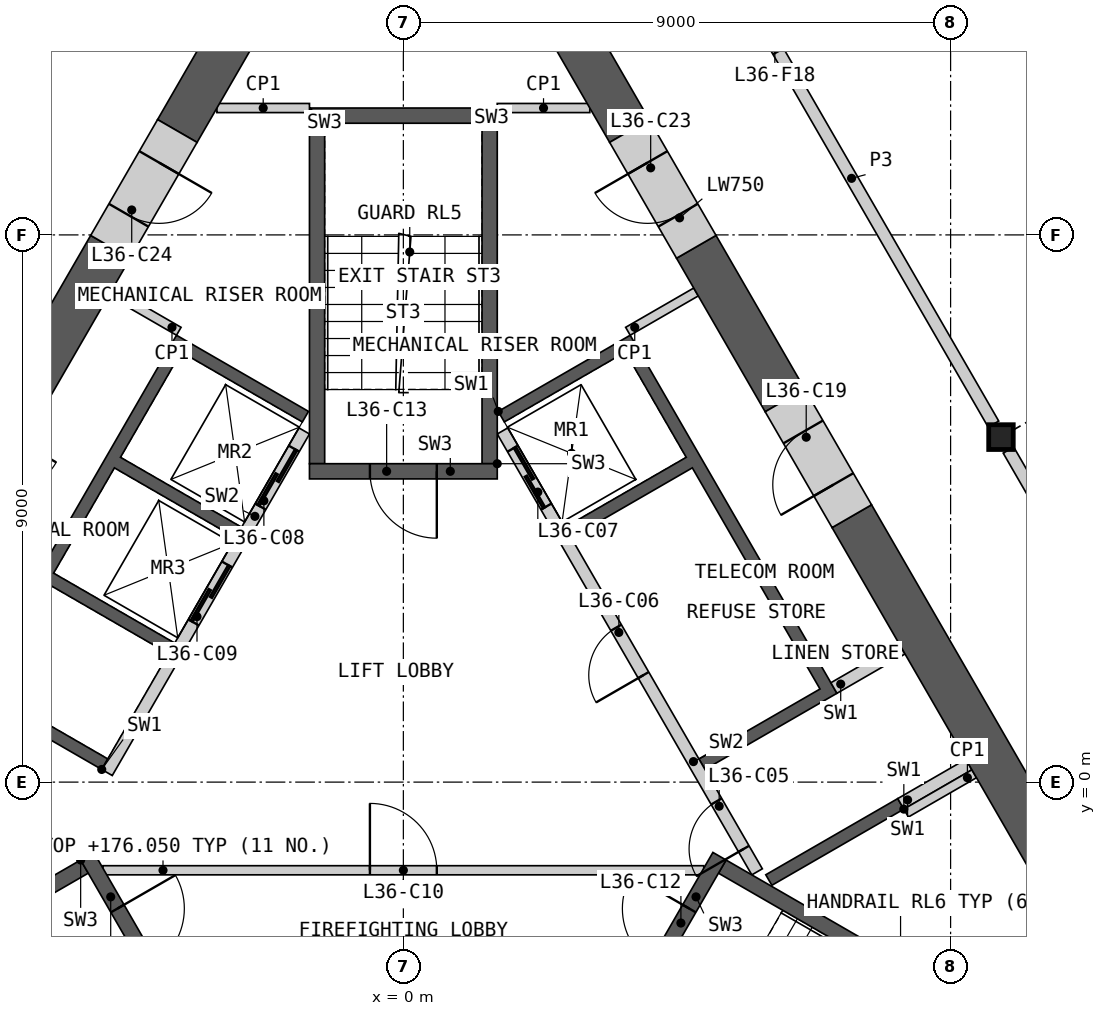
"""IFC4 building model, lengths in metres.
Left out: names, types, materials, properties, quantities, classifications, styles, units other than length and angle.
Written with IfcOpenShell. Run it as: python <this file> out.ifc"""

import sys

from ifc_helpers import new_model, si_unit, direction, frame, frame_2d, origin, origin_2d, place, context, subcontext, project, spatial, polyline, rectangle, i_section, outline, extrude, element, fill, save


model = new_model("IFC4")
c1 = context("Model", 3, precision=1e-05, world=origin(), true_north=direction((0.0, 1.0)))
c2 = subcontext(c1, "Body", "Model", "MODEL_VIEW")
j1 = project(units=[si_unit("LENGTHUNIT", "METRE"), si_unit("PLANEANGLEUNIT", "RADIAN")], contexts=[c1])
p1 = place(None, origin())
s1 = spatial("IfcSite", under=j1, at=p1, CompositionType="ELEMENT")
p2 = place(p1, origin())
s2 = spatial("IfcBuilding", under=s1, at=p2, CompositionType="ELEMENT")
p3 = place(p2, frame((0.0, 0.0, 172.8)))
s3 = spatial("IfcBuildingStorey", under=s2, at=p3, CompositionType="ELEMENT", Elevation=172.8)
p4 = place(p3, frame((9.828, 5.675, 0.0), z_axis=(0.0, 0.0, 1.0), x_axis=(1.0, 0.0, 0.0)))
e1 = element("IfcColumn", 1, at=p4, inside=s3, PredefinedType="COLUMN", context=c2, shape_type="SweptSolid", body=[
    extrude(i_section(OverallWidth=0.404, OverallDepth=0.407, WebThickness=0.027, FlangeThickness=0.044, at=origin_2d()), origin(), (0.0, 0.0, 1.0), 3.6),
])
p5 = place(p3, origin())
e2 = element("IfcWall", 2, at=p5, inside=s3, PredefinedType="SHEAR", context=c2, shape_type="SweptSolid", body=[
    extrude(outline(polyline([(1.561, 6.097), (3.731, 7.35), (7.131, 1.461), (4.96, 0.208), (4.861, 0.381), (6.852, 1.531), (4.752, 5.169), (2.76, 4.019), (2.66, 4.192), (4.652, 5.342), (3.652, 7.074), (1.66, 5.924), (1.561, 6.097)])), origin(), (0.0, 0.0, 1.0), 3.25),
])
p6 = place(p3, origin())
e3 = element("IfcWall", 3, at=p6, inside=s3, PredefinedType="SHEAR", context=c2, shape_type="SweptSolid", body=[
    extrude(outline(polyline([(8.231, -0.444), (6.061, -1.697), (5.96, -1.524), (8.131, -0.271), (8.231, -0.444)])), origin(), (0.0, 0.0, 1.0), 3.25),
])
p7 = place(p3, frame((5.817, -1.476, 0.0), z_axis=(0.0, 0.0, 1.0), x_axis=(-0.500002616675, 0.866023893041, 0.0)))
e4 = element("IfcWall", 4, at=p7, inside=s3, PredefinedType="SOLIDWALL", context=c2, shape_type="SweptSolid", body=[
    extrude(rectangle(XDim=8.373, YDim=0.2, at=frame_2d((4.187, 0.0))), origin(), (0.0, 0.0, 1.0), 3.25),
])
p8 = place(p7, frame((0.437, 0.0, 0.0)))
e5 = element("IfcOpeningElement", 5, at=p8, cuts=e4, PredefinedType="OPENING", context=c2, shape_type="SweptSolid", body=[
    extrude(rectangle(XDim=0.9, YDim=2.1, at=frame_2d((0.45, 1.05))), frame((0.0, 0.11, 0.0), z_axis=(0.0, -1.0, 0.0), x_axis=(1.0, 0.0, 0.0)), (0.0, 0.0, 1.0), 0.22),
])
p9 = place(p7, frame((3.737, 0.0, 0.0)))
e6 = element("IfcOpeningElement", 6, at=p9, cuts=e4, PredefinedType="OPENING", context=c2, shape_type="SweptSolid", body=[
    extrude(rectangle(XDim=0.9, YDim=2.1, at=frame_2d((0.45, 1.05))), frame((0.0, 0.11, 0.0), z_axis=(0.0, -1.0, 0.0), x_axis=(1.0, 0.0, 0.0)), (0.0, 0.0, 1.0), 0.22),
])
p10 = place(p7, frame((6.937, 0.0, 0.0)))
e7 = element("IfcOpeningElement", 7, at=p10, cuts=e4, PredefinedType="OPENING", context=c2, shape_type="SweptSolid", body=[
    extrude(rectangle(XDim=1.1, YDim=2.1, at=frame_2d((0.55, 1.05))), frame((0.0, 0.11, 0.0), z_axis=(0.0, -1.0, 0.0), x_axis=(1.0, 0.0, 0.0)), (0.0, 0.0, 1.0), 0.22),
])
for number, where, z_axis, x_axis in (
    (8, (8.181, -0.357, 0.0), (0.0, 0.0, 1.0), (0.866, 0.5, 0.0)),
    (9, (7.081, 1.548, 0.0), (0.0, 0.0, 1.0), (0.866, 0.5, 0.0)),
):
    element("IfcWall", number, at=place(p3, frame(where, z_axis=z_axis, x_axis=x_axis)), inside=s3, PredefinedType="SHEAR", context=c2, shape_type="SweptSolid", body=[
        extrude(rectangle(XDim=1.293, YDim=0.2, at=frame_2d((0.646, 0.0))), origin(), (0.0, 0.0, 1.0), 3.25),
    ])
p11 = place(p3, origin())
e10 = element("IfcWall", 10, at=p11, inside=s3, PredefinedType="SHEAR", context=c2, shape_type="SweptSolid", body=[
    extrude(outline(polyline([(-4.96, 0.208), (-7.131, 1.461), (-3.731, 7.35), (-1.561, 6.097), (-1.66, 5.924), (-3.652, 7.074), (-4.652, 5.342), (-2.66, 4.192), (-2.76, 4.019), (-4.752, 5.169), (-5.752, 3.437), (-3.76, 2.287), (-3.861, 2.113), (-5.852, 3.263), (-6.852, 1.531), (-4.861, 0.381), (-4.96, 0.208)])), origin(), (0.0, 0.0, 1.0), 3.25),
])
p12 = place(p3, frame((-1.631, 5.776, 0.0), z_axis=(0.0, 0.0, 1.0), x_axis=(-0.499992876559, -0.866029516466, 0.0)))
e11 = element("IfcWall", 11, at=p12, inside=s3, PredefinedType="SOLIDWALL", context=c2, shape_type="SweptSolid", body=[
    extrude(rectangle(XDim=6.486, YDim=0.2, at=frame_2d((3.243, 0.0))), origin(), (0.0, 0.0, 1.0), 3.25),
])
p13 = place(p12, frame((0.337, 0.0, 0.0)))
e12 = element("IfcOpeningElement", 12, at=p13, cuts=e11, PredefinedType="OPENING", context=c2, shape_type="SweptSolid", body=[
    extrude(rectangle(XDim=1.1, YDim=2.1, at=frame_2d((0.55, 1.05))), frame((0.0, 0.11, 0.0), z_axis=(0.0, -1.0, 0.0), x_axis=(1.0, 0.0, 0.0)), (0.0, 0.0, 1.0), 0.22),
])
p14 = place(p12, frame((2.537, 0.0, 0.0)))
e13 = element("IfcOpeningElement", 13, at=p14, cuts=e11, PredefinedType="OPENING", context=c2, shape_type="SweptSolid", body=[
    extrude(rectangle(XDim=1.1, YDim=2.1, at=frame_2d((0.55, 1.05))), frame((0.0, 0.11, 0.0), z_axis=(0.0, -1.0, 0.0), x_axis=(1.0, 0.0, 0.0)), (0.0, 0.0, 1.0), 0.22),
])
p15 = place(p3, frame((-4.941, -1.45, 0.0), z_axis=(0.0, 0.0, 1.0), x_axis=(1.0, 0.0, 0.0)))
e14 = element("IfcWall", 14, at=p15, inside=s3, PredefinedType="PARTITIONING", context=c2, shape_type="SweptSolid", body=[
    extrude(rectangle(XDim=9.882, YDim=0.15, at=frame_2d((4.941, 0.0))), origin(), (0.0, 0.0, 1.0), 3.25),
])
p16 = place(p15, frame((4.391, 0.0, 0.0)))
e15 = element("IfcOpeningElement", 15, at=p16, cuts=e14, PredefinedType="OPENING", context=c2, shape_type="SweptSolid", body=[
    extrude(rectangle(XDim=1.1, YDim=2.1, at=frame_2d((0.55, 1.05))), frame((0.0, 0.085, 0.0), z_axis=(0.0, -1.0, 0.0), x_axis=(1.0, 0.0, 0.0)), (0.0, 0.0, 1.0), 0.17),
])
p17 = place(p3, origin())
e16 = element("IfcWall", 16, at=p17, inside=s3, PredefinedType="SHEAR", context=c2, shape_type="SweptSolid", body=[
    extrude(outline(polyline([(-5.307, -1.281), (-10.374, -4.206), (-10.032, -4.298), (-5.182, -1.498), (-5.307, -1.281)])), origin(), (0.0, 0.0, 1.0), 3.25),
])
p18 = place(p3, frame((-5.199, -1.219, 0.0), z_axis=(0.0, 0.0, 1.0), x_axis=(0.499982516597, -0.866035497597, 0.0)))
e17 = element("IfcWall", 17, at=p18, inside=s3, PredefinedType="SHEAR", context=c2, shape_type="SweptSolid", body=[
    extrude(rectangle(XDim=3.088, YDim=0.25, at=frame_2d((1.544, 0.0))), origin(), (0.0, 0.0, 1.0), 3.25),
])
p19 = place(p18, frame((0.994, 0.0, 0.0)))
e18 = element("IfcOpeningElement", 18, at=p19, cuts=e17, PredefinedType="OPENING", context=c2, shape_type="SweptSolid", body=[
    extrude(rectangle(XDim=1.1, YDim=2.1, at=frame_2d((0.55, 1.05))), frame((0.0, 0.135, 0.0), z_axis=(0.0, -1.0, 0.0), x_axis=(1.0, 0.0, 0.0)), (0.0, 0.0, 1.0), 0.27),
])
p20 = place(p3, origin())
e19 = element("IfcWall", 19, at=p20, inside=s3, PredefinedType="SHEAR", context=c2, shape_type="SweptSolid", body=[
    extrude(outline(polyline([(10.032, -4.298), (10.374, -4.206), (5.307, -1.281), (5.182, -1.498), (10.032, -4.298)])), origin(), (0.0, 0.0, 1.0), 3.25),
])
p21 = place(p3, frame((3.655, -3.893, 0.0), z_axis=(0.0, 0.0, 1.0), x_axis=(0.499982516597, 0.866035497597, 0.0)))
e20 = element("IfcWall", 20, at=p21, inside=s3, PredefinedType="SHEAR", context=c2, shape_type="SweptSolid", body=[
    extrude(rectangle(XDim=3.088, YDim=0.25, at=frame_2d((1.544, 0.0))), origin(), (0.0, 0.0, 1.0), 3.25),
])
p22 = place(p21, frame((0.994, 0.0, 0.0)))
e21 = element("IfcOpeningElement", 21, at=p22, cuts=e20, PredefinedType="OPENING", context=c2, shape_type="SweptSolid", body=[
    extrude(rectangle(XDim=1.1, YDim=2.1, at=frame_2d((0.55, 1.05))), frame((0.0, 0.135, 0.0), z_axis=(0.0, -1.0, 0.0), x_axis=(1.0, 0.0, 0.0)), (0.0, 0.0, 1.0), 0.27),
])
p23 = place(p3, origin())
e22 = element("IfcWall", 22, at=p23, inside=s3, PredefinedType="SHEAR", context=c2, shape_type="SweptSolid", body=[
    extrude(outline(polyline([(1.544, 5.237), (1.544, 11.087), (1.294, 10.837), (1.294, 5.237), (1.544, 5.237)])), origin(), (0.0, 0.0, 1.0), 3.25),
])
p24 = place(p3, origin())
e23 = element("IfcWall", 23, at=p24, inside=s3, PredefinedType="SHEAR", context=c2, shape_type="SweptSolid", body=[
    extrude(outline(polyline([(1.544, 11.087), (-1.544, 11.087), (-1.294, 10.837), (1.294, 10.837), (1.544, 11.087)])), origin(), (0.0, 0.0, 1.0), 3.25),
])
p25 = place(p3, origin())
e24 = element("IfcWall", 24, at=p25, inside=s3, PredefinedType="SHEAR", context=c2, shape_type="SweptSolid", body=[
    extrude(outline(polyline([(-1.294, 10.837), (-1.544, 11.087), (-1.544, 5.237), (-1.294, 5.237), (-1.294, 10.837)])), origin(), (0.0, 0.0, 1.0), 3.25),
])
p26 = place(p3, frame((1.544, 5.112, 0.0), z_axis=(0.0, 0.0, 1.0), x_axis=(-1.0, 0.0, 0.0)))
e25 = element("IfcWall", 25, at=p26, inside=s3, PredefinedType="SHEAR", context=c2, shape_type="SweptSolid", body=[
    extrude(rectangle(XDim=3.088, YDim=0.25, at=frame_2d((1.544, 0.0))), origin(), (0.0, 0.0, 1.0), 3.25),
])
p27 = place(p26, frame((0.994, 0.0, 0.0)))
e26 = element("IfcOpeningElement", 26, at=p27, cuts=e25, PredefinedType="OPENING", context=c2, shape_type="SweptSolid", body=[
    extrude(rectangle(XDim=1.1, YDim=2.1, at=frame_2d((0.55, 1.05))), frame((0.0, 0.135, 0.0), z_axis=(0.0, -1.0, 0.0), x_axis=(1.0, 0.0, 0.0)), (0.0, 0.0, 1.0), 0.27),
])
for number, where, z_axis, x_axis in (
    (27, (3.693, 7.415, 0.0), (0.0, 0.0, 1.0), (0.866, 0.5, 0.0)),
    (28, (8.268, -0.509, 0.0), (0.0, 0.0, 1.0), (0.866, 0.5, 0.0)),
    (29, (-3.693, 7.415, 0.0), (0.0, 0.0, 1.0), (-0.866, 0.5, 0.0)),
):
    element("IfcWall", number, at=place(p3, frame(where, z_axis=z_axis, x_axis=x_axis)), inside=s3, PredefinedType="PARTITIONING", context=c2, shape_type="SweptSolid", body=[
        extrude(rectangle(XDim=1.293, YDim=0.15, at=frame_2d((0.646, 0.0))), origin(), (0.0, 0.0, 1.0), 3.25),
    ])
for number, where, z_axis, x_axis in (
    (30, (1.544, 11.087, 0.0), (0.0, 0.0, 1.0), (1.0, 0.0, 0.0)),
    (31, (-1.544, 11.087, 0.0), (0.0, 0.0, 1.0), (-1.0, 0.0, 0.0)),
):
    element("IfcWall", number, at=place(p3, frame(where, z_axis=z_axis, x_axis=x_axis)), inside=s3, PredefinedType="PARTITIONING", context=c2, shape_type="SweptSolid", body=[
        extrude(rectangle(XDim=1.522, YDim=0.15, at=frame_2d((0.761, 0.0))), origin(), (0.0, 0.0, 1.0), 3.25),
    ])
p28 = place(p3, frame((14.526, -8.011, 0.0), z_axis=(0.0, 0.0, 1.0), x_axis=(-0.499994855372, 0.866028374016, 0.0)))
e32 = element("IfcWall", 32, at=p28, inside=s3, PredefinedType="SHEAR", context=c2, shape_type="SweptSolid", body=[
    extrude(rectangle(XDim=14.301, YDim=0.75, at=frame_2d((7.15, 0.0))), origin(), (0.0, 0.0, 1.0), 3.25),
])
p29 = place(p3, frame((6.275, 6.279, 0.0), z_axis=(0.0, 0.0, 1.0), x_axis=(-0.500029273391, 0.866008502124, 0.0)))
e33 = element("IfcWall", 33, at=p29, inside=s3, PredefinedType="SHEAR", context=c2, shape_type="SweptSolid", body=[
    extrude(rectangle(XDim=2.916, YDim=0.75, at=frame_2d((1.458, 0.0))), origin(), (0.0, 0.0, 1.0), 3.25),
])
p30 = place(p3, frame((3.717, 10.709, 0.0), z_axis=(0.0, 0.0, 1.0), x_axis=(-0.500005599468, 0.866022170906, 0.0)))
e34 = element("IfcWall", 34, at=p30, inside=s3, PredefinedType="SHEAR", context=c2, shape_type="SweptSolid", body=[
    extrude(rectangle(XDim=2.662, YDim=0.75, at=frame_2d((1.331, 0.0))), origin(), (0.0, 0.0, 1.0), 3.25),
])
p31 = place(p3, frame((-0.325, 16.585, 0.0), z_axis=(0.0, 0.0, 1.0), x_axis=(-0.499993425452, -0.866029199568, 0.0)))
e35 = element("IfcWall", 35, at=p31, inside=s3, PredefinedType="SHEAR", context=c2, shape_type="SweptSolid", body=[
    extrude(rectangle(XDim=6.785, YDim=0.75, at=frame_2d((3.393, 0.0))), origin(), (0.0, 0.0, 1.0), 3.25),
])
p32 = place(p3, frame((-4.817, 8.804, 0.0), z_axis=(0.0, 0.0, 1.0), x_axis=(-0.500029273391, -0.866008502124, 0.0)))
e36 = element("IfcWall", 36, at=p32, inside=s3, PredefinedType="SHEAR", context=c2, shape_type="SweptSolid", body=[
    extrude(rectangle(XDim=2.916, YDim=0.75, at=frame_2d((1.458, 0.0))), origin(), (0.0, 0.0, 1.0), 3.25),
])
p33 = place(p3, frame((7.375, 4.374, 0.0), z_axis=(0.0, 0.0, 1.0), x_axis=(-0.499946605688, 0.86605622881, 0.0)))
e37 = element("IfcWall", 37, at=p33, inside=s3, PredefinedType="SHEAR", context=c2, shape_type="SweptSolid", body=[
    extrude(rectangle(XDim=2.2, YDim=0.75, at=frame_2d((1.1, 0.0))), origin(), (0.0, 0.0, 1.0), 3.25),
])
p34 = place(p33, frame((0.6, 0.0, 0.0)))
e38 = element("IfcOpeningElement", 38, at=p34, cuts=e37, PredefinedType="OPENING", context=c2, shape_type="SweptSolid", body=[
    extrude(rectangle(XDim=1.0, YDim=2.1, at=frame_2d((0.5, 1.05))), frame((0.0, 0.385, 0.0), z_axis=(0.0, -1.0, 0.0), x_axis=(1.0, 0.0, 0.0)), (0.0, 0.0, 1.0), 0.77),
])
p35 = place(p3, frame((4.817, 8.804, 0.0), z_axis=(0.0, 0.0, 1.0), x_axis=(-0.50002983664, 0.866008176907, 0.0)))
e39 = element("IfcWall", 39, at=p35, inside=s3, PredefinedType="SHEAR", context=c2, shape_type="SweptSolid", body=[
    extrude(rectangle(XDim=2.2, YDim=0.75, at=frame_2d((1.1, 0.0))), origin(), (0.0, 0.0, 1.0), 3.25),
])
p36 = place(p35, frame((0.6, 0.0, 0.0)))
e40 = element("IfcOpeningElement", 40, at=p36, cuts=e39, PredefinedType="OPENING", context=c2, shape_type="SweptSolid", body=[
    extrude(rectangle(XDim=1.0, YDim=2.1, at=frame_2d((0.5, 1.05))), frame((0.0, 0.385, 0.0), z_axis=(0.0, -1.0, 0.0), x_axis=(1.0, 0.0, 0.0)), (0.0, 0.0, 1.0), 0.77),
])
p37 = place(p3, frame((-3.717, 10.709, 0.0), z_axis=(0.0, 0.0, 1.0), x_axis=(-0.50002983664, -0.866008176907, 0.0)))
e41 = element("IfcWall", 41, at=p37, inside=s3, PredefinedType="SHEAR", context=c2, shape_type="SweptSolid", body=[
    extrude(rectangle(XDim=2.2, YDim=0.75, at=frame_2d((1.1, 0.0))), origin(), (0.0, 0.0, 1.0), 3.25),
])
p38 = place(p37, frame((0.6, 0.0, 0.0)))
e42 = element("IfcOpeningElement", 42, at=p38, cuts=e41, PredefinedType="OPENING", context=c2, shape_type="SweptSolid", body=[
    extrude(rectangle(XDim=1.0, YDim=2.1, at=frame_2d((0.5, 1.05))), frame((0.0, 0.385, 0.0), z_axis=(0.0, -1.0, 0.0), x_axis=(1.0, 0.0, 0.0)), (0.0, 0.0, 1.0), 0.77),
])
p39 = place(p3, frame((5.038, 13.972, 0.0), z_axis=(0.0, 0.0, 1.0), x_axis=(0.50000393355, -0.866023132736, 0.0)))
e43 = element("IfcWall", 43, at=p39, inside=s3, PredefinedType="PARTITIONING", context=c2, shape_type="SweptSolid", body=[
    extrude(rectangle(XDim=9.335, YDim=0.2, at=frame_2d((4.667, 0.0))), origin(), (0.0, 0.0, 1.0), 3.25),
])
p40 = place(p39, frame((1.154, 0.0, 0.0)))
e44 = element("IfcOpeningElement", 44, at=p40, cuts=e43, PredefinedType="OPENING", context=c2, shape_type="SweptSolid", body=[
    extrude(rectangle(XDim=1.1, YDim=2.1, at=frame_2d((0.55, 1.05))), frame((0.0, 0.11, 0.0), z_axis=(0.0, -1.0, 0.0), x_axis=(1.0, 0.0, 0.0)), (0.0, 0.0, 1.0), 0.22),
])
p41 = place(p3, frame((-9.705, 5.888, 0.0), z_axis=(0.0, 0.0, 1.0), x_axis=(0.50000393355, 0.866023132736, 0.0)))
e45 = element("IfcWall", 45, at=p41, inside=s3, PredefinedType="PARTITIONING", context=c2, shape_type="SweptSolid", body=[
    extrude(rectangle(XDim=9.335, YDim=0.2, at=frame_2d((4.667, 0.0))), origin(), (0.0, 0.0, 1.0), 3.25),
])
p42 = place(p41, frame((5.172, 0.0, 0.0)))
e46 = element("IfcOpeningElement", 46, at=p42, cuts=e45, PredefinedType="OPENING", context=c2, shape_type="SweptSolid", body=[
    extrude(rectangle(XDim=1.0, YDim=2.1, at=frame_2d((0.5, 1.05))), frame((0.0, 0.11, 0.0), z_axis=(0.0, -1.0, 0.0), x_axis=(1.0, 0.0, 0.0)), (0.0, 0.0, 1.0), 0.22),
])
p43 = place(p41, frame((1.556, 0.0, 0.0)))
e47 = element("IfcOpeningElement", 47, at=p43, cuts=e45, PredefinedType="OPENING", context=c2, shape_type="SweptSolid", body=[
    extrude(rectangle(XDim=1.8, YDim=2.1, at=frame_2d((0.9, 1.05))), frame((0.0, 0.11, 0.0), z_axis=(0.0, -1.0, 0.0), x_axis=(1.0, 0.0, 0.0)), (0.0, 0.0, 1.0), 0.22),
])
p44 = place(p3, frame((9.952, 5.461, 0.0), z_axis=(0.0, 0.0, 1.0), x_axis=(0.499990736708, -0.866030751883, 0.0)))
e48 = element("IfcWall", 48, at=p44, inside=s3, PredefinedType="PARTITIONING", context=c2, shape_type="SweptSolid", body=[
    extrude(rectangle(XDim=4.779, YDim=0.2, at=frame_2d((2.389, 0.0))), origin(), (0.0, 0.0, 1.0), 3.25),
])
p45 = place(p8, origin())
e49 = element("IfcDoor", 49, at=p45, inside=s3, OperationType="SINGLE_SWING_LEFT", PredefinedType="DOOR", context=c2, shape_type="SweptSolid", body=[
    extrude(rectangle(XDim=0.9, YDim=2.1, at=frame_2d((0.45, 1.05))), frame((0.0, 0.025, 0.0), z_axis=(0.0, -1.0, 0.0), x_axis=(1.0, 0.0, 0.0)), (0.0, 0.0, 1.0), 0.05),
])
fill(e5, e49)
p46 = place(p9, origin())
e50 = element("IfcDoor", 50, at=p46, inside=s3, OperationType="SINGLE_SWING_LEFT", PredefinedType="DOOR", context=c2, shape_type="SweptSolid", body=[
    extrude(rectangle(XDim=0.9, YDim=2.1, at=frame_2d((0.45, 1.05))), frame((0.0, 0.025, 0.0), z_axis=(0.0, -1.0, 0.0), x_axis=(1.0, 0.0, 0.0)), (0.0, 0.0, 1.0), 0.05),
])
fill(e6, e50)
p47 = place(p10, origin())
e51 = element("IfcDoor", 51, at=p47, inside=s3, OperationType="SLIDING_TO_LEFT", PredefinedType="DOOR", context=c2, shape_type="SweptSolid", body=[
    extrude(rectangle(XDim=1.1, YDim=2.1, at=frame_2d((0.55, 1.05))), frame((0.0, 0.025, 0.0), z_axis=(0.0, -1.0, 0.0), x_axis=(1.0, 0.0, 0.0)), (0.0, 0.0, 1.0), 0.05),
])
fill(e7, e51)
p48 = place(p13, origin())
e52 = element("IfcDoor", 52, at=p48, inside=s3, OperationType="SLIDING_TO_LEFT", PredefinedType="DOOR", context=c2, shape_type="SweptSolid", body=[
    extrude(rectangle(XDim=1.1, YDim=2.1, at=frame_2d((0.55, 1.05))), frame((0.0, 0.025, 0.0), z_axis=(0.0, -1.0, 0.0), x_axis=(1.0, 0.0, 0.0)), (0.0, 0.0, 1.0), 0.05),
])
fill(e12, e52)
p49 = place(p14, origin())
e53 = element("IfcDoor", 53, at=p49, inside=s3, OperationType="SLIDING_TO_LEFT", PredefinedType="DOOR", context=c2, shape_type="SweptSolid", body=[
    extrude(rectangle(XDim=1.1, YDim=2.1, at=frame_2d((0.55, 1.05))), frame((0.0, 0.025, 0.0), z_axis=(0.0, -1.0, 0.0), x_axis=(1.0, 0.0, 0.0)), (0.0, 0.0, 1.0), 0.05),
])
fill(e13, e53)
p50 = place(p16, origin())
e54 = element("IfcDoor", 54, at=p50, inside=s3, OperationType="SINGLE_SWING_LEFT", PredefinedType="DOOR", context=c2, shape_type="SweptSolid", body=[
    extrude(rectangle(XDim=1.1, YDim=2.1, at=frame_2d((0.55, 1.05))), frame((0.0, 0.025, 0.0), z_axis=(0.0, -1.0, 0.0), x_axis=(1.0, 0.0, 0.0)), (0.0, 0.0, 1.0), 0.05),
])
fill(e15, e54)
p51 = place(p19, origin())
e55 = element("IfcDoor", 55, at=p51, inside=s3, OperationType="SINGLE_SWING_LEFT", PredefinedType="DOOR", context=c2, shape_type="SweptSolid", body=[
    extrude(rectangle(XDim=1.1, YDim=2.1, at=frame_2d((0.55, 1.05))), frame((0.0, 0.025, 0.0), z_axis=(0.0, -1.0, 0.0), x_axis=(1.0, 0.0, 0.0)), (0.0, 0.0, 1.0), 0.05),
])
fill(e18, e55)
p52 = place(p22, origin())
e56 = element("IfcDoor", 56, at=p52, inside=s3, OperationType="SINGLE_SWING_RIGHT", PredefinedType="DOOR", context=c2, shape_type="SweptSolid", body=[
    extrude(rectangle(XDim=1.1, YDim=2.1, at=frame_2d((0.55, 1.05))), frame((0.0, 0.025, 0.0), z_axis=(0.0, -1.0, 0.0), x_axis=(1.0, 0.0, 0.0)), (0.0, 0.0, 1.0), 0.05),
])
fill(e21, e56)
p53 = place(p27, origin())
e57 = element("IfcDoor", 57, at=p53, inside=s3, OperationType="SINGLE_SWING_LEFT", PredefinedType="DOOR", context=c2, shape_type="SweptSolid", body=[
    extrude(rectangle(XDim=1.1, YDim=2.1, at=frame_2d((0.55, 1.05))), frame((0.0, 0.025, 0.0), z_axis=(0.0, -1.0, 0.0), x_axis=(1.0, 0.0, 0.0)), (0.0, 0.0, 1.0), 0.05),
])
fill(e26, e57)
p54 = place(p34, origin())
e58 = element("IfcDoor", 58, at=p54, inside=s3, OperationType="SINGLE_SWING_LEFT", PredefinedType="DOOR", context=c2, shape_type="SweptSolid", body=[
    extrude(rectangle(XDim=1.0, YDim=2.1, at=frame_2d((0.5, 1.05))), frame((0.0, 0.13, 0.0), z_axis=(0.0, -1.0, 0.0), x_axis=(1.0, 0.0, 0.0)), (0.0, 0.0, 1.0), 0.05),
])
fill(e38, e58)
p55 = place(p36, origin())
e59 = element("IfcDoor", 59, at=p55, inside=s3, OperationType="SINGLE_SWING_RIGHT", PredefinedType="DOOR", context=c2, shape_type="SweptSolid", body=[
    extrude(rectangle(XDim=1.0, YDim=2.1, at=frame_2d((0.5, 1.05))), frame((0.0, 0.13, 0.0), z_axis=(0.0, -1.0, 0.0), x_axis=(1.0, 0.0, 0.0)), (0.0, 0.0, 1.0), 0.05),
])
fill(e40, e59)
p56 = place(p38, origin())
e60 = element("IfcDoor", 60, at=p56, inside=s3, OperationType="SINGLE_SWING_LEFT", PredefinedType="DOOR", context=c2, shape_type="SweptSolid", body=[
    extrude(rectangle(XDim=1.0, YDim=2.1, at=frame_2d((0.5, 1.05))), frame((0.0, 0.13, 0.0), z_axis=(0.0, -1.0, 0.0), x_axis=(1.0, 0.0, 0.0)), (0.0, 0.0, 1.0), 0.05),
])
fill(e42, e60)
p57 = place(p40, origin())
e61 = element("IfcDoor", 61, at=p57, inside=s3, OperationType="SINGLE_SWING_RIGHT", PredefinedType="DOOR", context=c2, shape_type="SweptSolid", body=[
    extrude(rectangle(XDim=1.1, YDim=2.1, at=frame_2d((0.55, 1.05))), frame((0.0, 0.025, 0.0), z_axis=(0.0, -1.0, 0.0), x_axis=(1.0, 0.0, 0.0)), (0.0, 0.0, 1.0), 0.05),
])
fill(e44, e61)
save(model, sys.argv[1])
